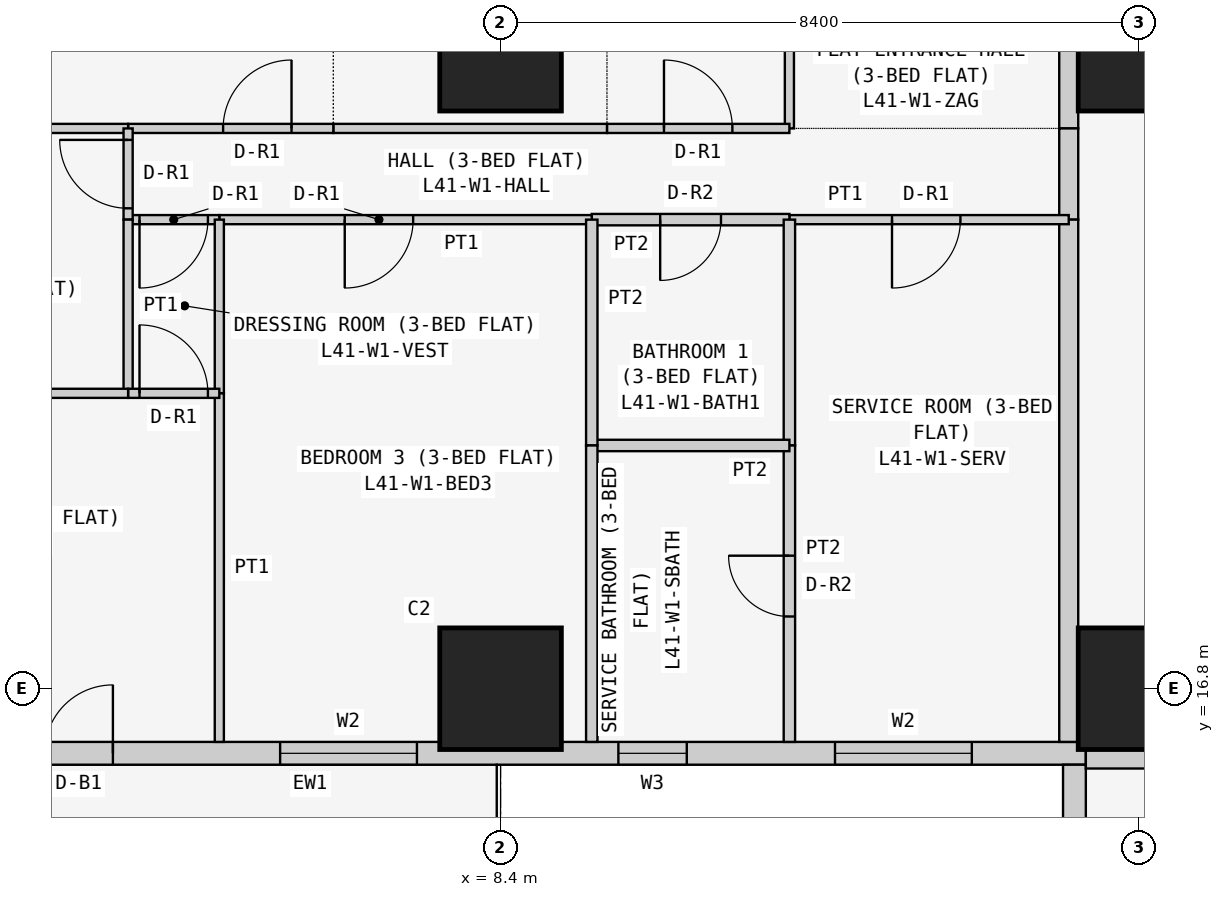
"""IFC4 building model, lengths in metres.
Left out: names, types, materials, properties, quantities, classifications, styles, units other than length and angle.
Written with IfcOpenShell. Run it as: python <this file> out.ifc"""

import sys

from ifc_helpers import new_model, si_unit, direction, frame, frame_2d, origin, origin_2d, place, context, subcontext, project, spatial, rectangle, extrude, element, fill, save


model = new_model("IFC4")
c1 = context("Model", 3, precision=1e-05, world=origin(), true_north=direction((0.0, 1.0)))
c2 = subcontext(c1, "Body", "Model", "MODEL_VIEW")
j1 = project(units=[si_unit("LENGTHUNIT", "METRE"), si_unit("PLANEANGLEUNIT", "RADIAN")], contexts=[c1])
p1 = place(None, origin())
s1 = spatial("IfcSite", under=j1, at=p1, CompositionType="ELEMENT")
p2 = place(p1, origin())
s2 = spatial("IfcBuilding", under=s1, at=p2, CompositionType="ELEMENT")
p3 = place(p2, frame((0.0, 0.0, 159.3)))
s3 = spatial("IfcBuildingStorey", under=s2, at=p3, CompositionType="ELEMENT", Elevation=159.3)
for number, where, z_axis, x_axis in (
    (1, (8.4, 16.8, 0.0), (0.0, 0.0, 1.0), (1.0, 0.0, 0.0)),
    (2, (8.4, 25.2, 0.0), (0.0, 0.0, 1.0), (1.0, 0.0, 0.0)),
    (3, (16.8, 16.8, 0.0), (0.0, 0.0, 1.0), (1.0, 0.0, 0.0)),
    (4, (16.8, 25.2, 0.0), (0.0, 0.0, 1.0), (1.0, 0.0, 0.0)),
):
    element("IfcColumn", number, at=place(p3, frame(where, z_axis=z_axis, x_axis=x_axis)), inside=s3, PredefinedType="COLUMN", context=c2, shape_type="SweptSolid", body=[
        extrude(rectangle(XDim=1.6, YDim=1.6, at=origin_2d()), origin(), (0.0, 0.0, 1.0), 3.6),
    ])
p4 = place(p3, frame((0.4, 15.95, 0.0), z_axis=(0.0, 0.0, 1.0), x_axis=(1.0, 0.0, 0.0)))
e5 = element("IfcWall", 5, at=p4, inside=s3, PredefinedType="SOLIDWALL", context=c2, shape_type="SweptSolid", body=[
    extrude(rectangle(XDim=15.7, YDim=0.3, at=frame_2d((7.85, 0.0))), origin(), (0.0, 0.0, 1.0), 3.45),
])
p5 = place(p4, frame((12.4, 0.0, 0.9)))
e6 = element("IfcOpeningElement", 6, at=p5, cuts=e5, PredefinedType="OPENING", context=c2, shape_type="SweptSolid", body=[
    extrude(rectangle(XDim=1.8, YDim=1.5, at=frame_2d((0.9, 0.75))), frame((0.0, 0.16, 0.0), z_axis=(0.0, -1.0, 0.0), x_axis=(1.0, 0.0, 0.0)), (0.0, 0.0, 1.0), 0.32),
])
p6 = place(p4, frame((9.55, 0.0, 1.5)))
e7 = element("IfcOpeningElement", 7, at=p6, cuts=e5, PredefinedType="OPENING", context=c2, shape_type="SweptSolid", body=[
    extrude(rectangle(XDim=0.9, YDim=0.7, at=frame_2d((0.45, 0.35))), frame((0.0, 0.16, 0.0), z_axis=(0.0, -1.0, 0.0), x_axis=(1.0, 0.0, 0.0)), (0.0, 0.0, 1.0), 0.32),
])
p7 = place(p4, frame((5.1, 0.0, 0.9)))
e8 = element("IfcOpeningElement", 8, at=p7, cuts=e5, PredefinedType="OPENING", context=c2, shape_type="SweptSolid", body=[
    extrude(rectangle(XDim=1.8, YDim=1.5, at=frame_2d((0.9, 0.75))), frame((0.0, 0.16, 0.0), z_axis=(0.0, -1.0, 0.0), x_axis=(1.0, 0.0, 0.0)), (0.0, 0.0, 1.0), 0.32),
])
p8 = place(p4, frame((2.0, 0.0, 0.0)))
e9 = element("IfcOpeningElement", 9, at=p8, cuts=e5, PredefinedType="OPENING", context=c2, shape_type="SweptSolid", body=[
    extrude(rectangle(XDim=0.9, YDim=2.4, at=frame_2d((0.45, 1.2))), frame((0.0, 0.16, 0.0), z_axis=(0.0, -1.0, 0.0), x_axis=(1.0, 0.0, 0.0)), (0.0, 0.0, 1.0), 0.32),
])
p9 = place(p4, frame((0.7, 0.0, 0.9)))
e10 = element("IfcOpeningElement", 10, at=p9, cuts=e5, PredefinedType="OPENING", context=c2, shape_type="SweptSolid", body=[
    extrude(rectangle(XDim=1.2, YDim=1.5, at=frame_2d((0.6, 0.75))), frame((0.0, 0.16, 0.0), z_axis=(0.0, -1.0, 0.0), x_axis=(1.0, 0.0, 0.0)), (0.0, 0.0, 1.0), 0.32),
])
p10 = place(p3, frame((15.95, 15.8, 0.0), z_axis=(0.0, 0.0, 1.0), x_axis=(0.0, -1.0, 0.0)))
e11 = element("IfcWall", 11, at=p10, inside=s3, PredefinedType="SOLIDWALL", context=c2, shape_type="SweptSolid", body=[
    extrude(rectangle(XDim=7.0, YDim=0.3, at=frame_2d((3.5, 0.0))), origin(), (0.0, 0.0, 1.0), 3.45),
])
p11 = place(p10, frame((1.5, 0.0, 0.9)))
e12 = element("IfcOpeningElement", 12, at=p11, cuts=e11, PredefinedType="OPENING", context=c2, shape_type="SweptSolid", body=[
    extrude(rectangle(XDim=2.4, YDim=1.5, at=frame_2d((1.2, 0.75))), frame((0.0, 0.16, 0.0), z_axis=(0.0, -1.0, 0.0), x_axis=(1.0, 0.0, 0.0)), (0.0, 0.0, 1.0), 0.32),
])
p12 = place(p10, frame((5.05, 0.0, 0.9)))
e13 = element("IfcOpeningElement", 13, at=p12, cuts=e11, PredefinedType="OPENING", context=c2, shape_type="SweptSolid", body=[
    extrude(rectangle(XDim=1.2, YDim=1.5, at=frame_2d((0.6, 0.75))), frame((0.0, 0.16, 0.0), z_axis=(0.0, -1.0, 0.0), x_axis=(1.0, 0.0, 0.0)), (0.0, 0.0, 1.0), 0.32),
])
p13 = place(p3, frame((22.571, 15.875, 0.0), z_axis=(0.0, 0.0, 1.0), x_axis=(-1.0, 0.0, 0.0)))
e14 = element("IfcWall", 14, at=p13, inside=s3, PredefinedType="PARTITIONING", context=c2, shape_type="SweptSolid", body=[
    extrude(rectangle(XDim=6.471, YDim=0.25, at=frame_2d((3.235, 0.0))), origin(), (0.0, 0.0, 1.0), 3.45),
])
p14 = place(p3, frame((15.875, 24.171, 0.0), z_axis=(0.0, 0.0, 1.0), x_axis=(0.0, 1.0, 0.0)))
e15 = element("IfcWall", 15, at=p14, inside=s3, PredefinedType="PARTITIONING", context=c2, shape_type="SweptSolid", body=[
    extrude(rectangle(XDim=5.229, YDim=0.25, at=frame_2d((2.615, 0.0))), origin(), (0.0, 0.0, 1.0), 3.45),
])
p15 = place(p14, frame((2.129, 0.0, 0.0)))
e16 = element("IfcOpeningElement", 16, at=p15, cuts=e15, PredefinedType="OPENING", context=c2, shape_type="SweptSolid", body=[
    extrude(rectangle(XDim=1.0, YDim=2.1, at=frame_2d((0.5, 1.05))), frame((0.0, 0.135, 0.0), z_axis=(0.0, -1.0, 0.0), x_axis=(1.0, 0.0, 0.0)), (0.0, 0.0, 1.0), 0.27),
])
p16 = place(p3, frame((15.875, 22.971, 0.0), z_axis=(0.0, 0.0, 1.0), x_axis=(0.0, 1.0, 0.0)))
e17 = element("IfcWall", 17, at=p16, inside=s3, PredefinedType="PARTITIONING", context=c2, shape_type="SweptSolid", body=[
    extrude(rectangle(XDim=1.2, YDim=0.25, at=frame_2d((0.6, 0.0))), origin(), (0.0, 0.0, 1.0), 3.45),
])
p17 = place(p3, frame((15.875, 16.1, 0.0), z_axis=(0.0, 0.0, 1.0), x_axis=(0.0, 1.0, 0.0)))
e18 = element("IfcWall", 18, at=p17, inside=s3, PredefinedType="PARTITIONING", context=c2, shape_type="SweptSolid", body=[
    extrude(rectangle(XDim=6.871, YDim=0.25, at=frame_2d((3.436, 0.0))), origin(), (0.0, 0.0, 1.0), 3.45),
])
p18 = place(p3, frame((12.2, 29.4, 0.0), z_axis=(0.0, 0.0, 1.0), x_axis=(0.0, -1.0, 0.0)))
e19 = element("IfcWall", 19, at=p18, inside=s3, PredefinedType="PARTITIONING", context=c2, shape_type="SweptSolid", body=[
    extrude(rectangle(XDim=5.229, YDim=0.12, at=frame_2d((2.615, 0.0))), origin(), (0.0, 0.0, 1.0), 3.45),
])
p19 = place(p3, frame((9.8, 24.171, 0.0), z_axis=(0.0, 0.0, 1.0), x_axis=(1.0, 0.0, 0.0)))
e20 = element("IfcWall", 20, at=p19, inside=s3, PredefinedType="PARTITIONING", context=c2, shape_type="SweptSolid", body=[
    extrude(rectangle(XDim=2.4, YDim=0.12, at=frame_2d((1.2, 0.0))), origin(), (0.0, 0.0, 1.0), 3.45),
])
p20 = place(p19, frame((0.75, 0.0, 0.0)))
e21 = element("IfcOpeningElement", 21, at=p20, cuts=e20, PredefinedType="OPENING", context=c2, shape_type="SweptSolid", body=[
    extrude(rectangle(XDim=0.9, YDim=2.1, at=frame_2d((0.45, 1.05))), frame((0.0, 0.07, 0.0), z_axis=(0.0, -1.0, 0.0), x_axis=(1.0, 0.0, 0.0)), (0.0, 0.0, 1.0), 0.14),
])
p21 = place(p3, frame((6.2, 24.171, 0.0), z_axis=(0.0, 0.0, 1.0), x_axis=(1.0, 0.0, 0.0)))
e22 = element("IfcWall", 22, at=p21, inside=s3, PredefinedType="PARTITIONING", context=c2, shape_type="SweptSolid", body=[
    extrude(rectangle(XDim=3.6, YDim=0.12, at=frame_2d((1.8, 0.0))), origin(), (0.0, 0.0, 1.0), 3.45),
])
p22 = place(p3, frame((3.5, 24.171, 0.0), z_axis=(0.0, 0.0, 1.0), x_axis=(1.0, 0.0, 0.0)))
e23 = element("IfcWall", 23, at=p22, inside=s3, PredefinedType="PARTITIONING", context=c2, shape_type="SweptSolid", body=[
    extrude(rectangle(XDim=2.7, YDim=0.12, at=frame_2d((1.35, 0.0))), origin(), (0.0, 0.0, 1.0), 3.45),
])
p23 = place(p22, frame((1.25, 0.0, 0.0)))
e24 = element("IfcOpeningElement", 24, at=p23, cuts=e23, PredefinedType="OPENING", context=c2, shape_type="SweptSolid", body=[
    extrude(rectangle(XDim=0.9, YDim=2.1, at=frame_2d((0.45, 1.05))), frame((0.0, 0.07, 0.0), z_axis=(0.0, -1.0, 0.0), x_axis=(1.0, 0.0, 0.0)), (0.0, 0.0, 1.0), 0.14),
])
p24 = place(p3, frame((-0.65, 24.171, 0.0), z_axis=(0.0, 0.0, 1.0), x_axis=(1.0, 0.0, 0.0)))
e25 = element("IfcWall", 25, at=p24, inside=s3, PredefinedType="PARTITIONING", context=c2, shape_type="SweptSolid", body=[
    extrude(rectangle(XDim=4.15, YDim=0.12, at=frame_2d((2.075, 0.0))), origin(), (0.0, 0.0, 1.0), 3.45),
])
p25 = place(p3, frame((12.2, 22.971, 0.0), z_axis=(0.0, 0.0, 1.0), x_axis=(1.0, 0.0, 0.0)))
e26 = element("IfcWall", 26, at=p25, inside=s3, PredefinedType="PARTITIONING", context=c2, shape_type="SweptSolid", body=[
    extrude(rectangle(XDim=3.675, YDim=0.12, at=frame_2d((1.837, 0.0))), origin(), (0.0, 0.0, 1.0), 3.45),
])
p26 = place(p25, frame((1.35, 0.0, 0.0)))
e27 = element("IfcOpeningElement", 27, at=p26, cuts=e26, PredefinedType="OPENING", context=c2, shape_type="SweptSolid", body=[
    extrude(rectangle(XDim=0.9, YDim=2.1, at=frame_2d((0.45, 1.05))), frame((0.0, 0.07, 0.0), z_axis=(0.0, -1.0, 0.0), x_axis=(1.0, 0.0, 0.0)), (0.0, 0.0, 1.0), 0.14),
])
p27 = place(p3, frame((9.6, 22.971, 0.0), z_axis=(0.0, 0.0, 1.0), x_axis=(1.0, 0.0, 0.0)))
e28 = element("IfcWall", 28, at=p27, inside=s3, PredefinedType="PARTITIONING", context=c2, shape_type="SweptSolid", body=[
    extrude(rectangle(XDim=2.6, YDim=0.15, at=frame_2d((1.3, 0.0))), origin(), (0.0, 0.0, 1.0), 3.45),
])
p28 = place(p27, frame((0.9, 0.0, 0.0)))
e29 = element("IfcOpeningElement", 29, at=p28, cuts=e28, PredefinedType="OPENING", context=c2, shape_type="SweptSolid", body=[
    extrude(rectangle(XDim=0.8, YDim=2.1, at=frame_2d((0.4, 1.05))), frame((0.0, 0.085, 0.0), z_axis=(0.0, -1.0, 0.0), x_axis=(1.0, 0.0, 0.0)), (0.0, 0.0, 1.0), 0.17),
])
p29 = place(p3, frame((4.7, 22.971, 0.0), z_axis=(0.0, 0.0, 1.0), x_axis=(1.0, 0.0, 0.0)))
e30 = element("IfcWall", 30, at=p29, inside=s3, PredefinedType="PARTITIONING", context=c2, shape_type="SweptSolid", body=[
    extrude(rectangle(XDim=4.9, YDim=0.12, at=frame_2d((2.45, 0.0))), origin(), (0.0, 0.0, 1.0), 3.45),
])
p30 = place(p29, frame((1.65, 0.0, 0.0)))
e31 = element("IfcOpeningElement", 31, at=p30, cuts=e30, PredefinedType="OPENING", context=c2, shape_type="SweptSolid", body=[
    extrude(rectangle(XDim=0.9, YDim=2.1, at=frame_2d((0.45, 1.05))), frame((0.0, 0.07, 0.0), z_axis=(0.0, -1.0, 0.0), x_axis=(1.0, 0.0, 0.0)), (0.0, 0.0, 1.0), 0.14),
])
p31 = place(p3, frame((3.5, 22.971, 0.0), z_axis=(0.0, 0.0, 1.0), x_axis=(1.0, 0.0, 0.0)))
e32 = element("IfcWall", 32, at=p31, inside=s3, PredefinedType="PARTITIONING", context=c2, shape_type="SweptSolid", body=[
    extrude(rectangle(XDim=1.2, YDim=0.12, at=frame_2d((0.6, 0.0))), origin(), (0.0, 0.0, 1.0), 3.45),
])
p32 = place(p31, frame((0.15, 0.0, 0.0)))
e33 = element("IfcOpeningElement", 33, at=p32, cuts=e32, PredefinedType="OPENING", context=c2, shape_type="SweptSolid", body=[
    extrude(rectangle(XDim=0.9, YDim=2.1, at=frame_2d((0.45, 1.05))), frame((0.0, 0.07, 0.0), z_axis=(0.0, -1.0, 0.0), x_axis=(1.0, 0.0, 0.0)), (0.0, 0.0, 1.0), 0.14),
])
p33 = place(p3, frame((3.5, 24.171, 0.0), z_axis=(0.0, 0.0, 1.0), x_axis=(0.0, -1.0, 0.0)))
e34 = element("IfcWall", 34, at=p33, inside=s3, PredefinedType="PARTITIONING", context=c2, shape_type="SweptSolid", body=[
    extrude(rectangle(XDim=1.2, YDim=0.12, at=frame_2d((0.6, 0.0))), origin(), (0.0, 0.0, 1.0), 3.45),
])
p34 = place(p33, frame((0.151, 0.0, 0.0)))
e35 = element("IfcOpeningElement", 35, at=p34, cuts=e34, PredefinedType="OPENING", context=c2, shape_type="SweptSolid", body=[
    extrude(rectangle(XDim=0.9, YDim=2.1, at=frame_2d((0.45, 1.05))), frame((0.0, 0.07, 0.0), z_axis=(0.0, -1.0, 0.0), x_axis=(1.0, 0.0, 0.0)), (0.0, 0.0, 1.0), 0.14),
])
p35 = place(p3, frame((12.2, 22.971, 0.0), z_axis=(0.0, 0.0, 1.0), x_axis=(0.0, -1.0, 0.0)))
e36 = element("IfcWall", 36, at=p35, inside=s3, PredefinedType="PARTITIONING", context=c2, shape_type="SweptSolid", body=[
    extrude(rectangle(XDim=2.971, YDim=0.15, at=frame_2d((1.485, 0.0))), origin(), (0.0, 0.0, 1.0), 3.45),
])
p36 = place(p3, frame((12.2, 20.0, 0.0), z_axis=(0.0, 0.0, 1.0), x_axis=(0.0, -1.0, 0.0)))
e37 = element("IfcWall", 37, at=p36, inside=s3, PredefinedType="PARTITIONING", context=c2, shape_type="SweptSolid", body=[
    extrude(rectangle(XDim=3.9, YDim=0.15, at=frame_2d((1.95, 0.0))), origin(), (0.0, 0.0, 1.0), 3.45),
])
p37 = place(p36, frame((1.45, 0.0, 0.0)))
e38 = element("IfcOpeningElement", 38, at=p37, cuts=e37, PredefinedType="OPENING", context=c2, shape_type="SweptSolid", body=[
    extrude(rectangle(XDim=0.8, YDim=2.1, at=frame_2d((0.4, 1.05))), frame((0.0, 0.085, 0.0), z_axis=(0.0, -1.0, 0.0), x_axis=(1.0, 0.0, 0.0)), (0.0, 0.0, 1.0), 0.17),
])
p38 = place(p3, frame((9.6, 20.0, 0.0), z_axis=(0.0, 0.0, 1.0), x_axis=(1.0, 0.0, 0.0)))
e39 = element("IfcWall", 39, at=p38, inside=s3, PredefinedType="PARTITIONING", context=c2, shape_type="SweptSolid", body=[
    extrude(rectangle(XDim=2.6, YDim=0.15, at=frame_2d((1.3, 0.0))), origin(), (0.0, 0.0, 1.0), 3.45),
])
p39 = place(p3, frame((9.6, 22.971, 0.0), z_axis=(0.0, 0.0, 1.0), x_axis=(0.0, -1.0, 0.0)))
e40 = element("IfcWall", 40, at=p39, inside=s3, PredefinedType="PARTITIONING", context=c2, shape_type="SweptSolid", body=[
    extrude(rectangle(XDim=2.971, YDim=0.15, at=frame_2d((1.485, 0.0))), origin(), (0.0, 0.0, 1.0), 3.45),
])
p40 = place(p3, frame((9.6, 20.0, 0.0), z_axis=(0.0, 0.0, 1.0), x_axis=(0.0, -1.0, 0.0)))
e41 = element("IfcWall", 41, at=p40, inside=s3, PredefinedType="PARTITIONING", context=c2, shape_type="SweptSolid", body=[
    extrude(rectangle(XDim=3.9, YDim=0.15, at=frame_2d((1.95, 0.0))), origin(), (0.0, 0.0, 1.0), 3.45),
])
p41 = place(p3, frame((4.7, 22.971, 0.0), z_axis=(0.0, 0.0, 1.0), x_axis=(0.0, -1.0, 0.0)))
e42 = element("IfcWall", 42, at=p41, inside=s3, PredefinedType="PARTITIONING", context=c2, shape_type="SweptSolid", body=[
    extrude(rectangle(XDim=2.285, YDim=0.12, at=frame_2d((1.143, 0.0))), origin(), (0.0, 0.0, 1.0), 3.45),
])
p42 = place(p3, frame((4.7, 20.686, 0.0), z_axis=(0.0, 0.0, 1.0), x_axis=(0.0, -1.0, 0.0)))
e43 = element("IfcWall", 43, at=p42, inside=s3, PredefinedType="PARTITIONING", context=c2, shape_type="SweptSolid", body=[
    extrude(rectangle(XDim=4.586, YDim=0.12, at=frame_2d((2.293, 0.0))), origin(), (0.0, 0.0, 1.0), 3.45),
])
p43 = place(p3, frame((3.5, 22.971, 0.0), z_axis=(0.0, 0.0, 1.0), x_axis=(0.0, -1.0, 0.0)))
e44 = element("IfcWall", 44, at=p43, inside=s3, PredefinedType="PARTITIONING", context=c2, shape_type="SweptSolid", body=[
    extrude(rectangle(XDim=2.285, YDim=0.12, at=frame_2d((1.143, 0.0))), origin(), (0.0, 0.0, 1.0), 3.45),
])
p44 = place(p3, frame((3.5, 20.686, 0.0), z_axis=(0.0, 0.0, 1.0), x_axis=(1.0, 0.0, 0.0)))
e45 = element("IfcWall", 45, at=p44, inside=s3, PredefinedType="PARTITIONING", context=c2, shape_type="SweptSolid", body=[
    extrude(rectangle(XDim=1.2, YDim=0.12, at=frame_2d((0.6, 0.0))), origin(), (0.0, 0.0, 1.0), 3.45),
])
p45 = place(p44, frame((0.15, 0.0, 0.0)))
e46 = element("IfcOpeningElement", 46, at=p45, cuts=e45, PredefinedType="OPENING", context=c2, shape_type="SweptSolid", body=[
    extrude(rectangle(XDim=0.9, YDim=2.1, at=frame_2d((0.45, 1.05))), frame((0.0, 0.07, 0.0), z_axis=(0.0, -1.0, 0.0), x_axis=(1.0, 0.0, 0.0)), (0.0, 0.0, 1.0), 0.14),
])
p46 = place(p3, frame((-0.65, 20.686, 0.0), z_axis=(0.0, 0.0, 1.0), x_axis=(1.0, 0.0, 0.0)))
e47 = element("IfcWall", 47, at=p46, inside=s3, PredefinedType="PARTITIONING", context=c2, shape_type="SweptSolid", body=[
    extrude(rectangle(XDim=4.15, YDim=0.12, at=frame_2d((2.075, 0.0))), origin(), (0.0, 0.0, 1.0), 3.45),
])
p47 = place(p5, origin())
e48 = element("IfcWindow", 48, at=p47, inside=s3, PartitioningType="SINGLE_PANEL", PredefinedType="WINDOW", context=c2, shape_type="SweptSolid", body=[
    extrude(rectangle(XDim=1.8, YDim=1.5, at=frame_2d((0.9, 0.75))), frame((0.0, 0.03, 0.0), z_axis=(0.0, -1.0, 0.0), x_axis=(1.0, 0.0, 0.0)), (0.0, 0.0, 1.0), 0.06),
])
fill(e6, e48)
p48 = place(p6, origin())
e49 = element("IfcWindow", 49, at=p48, inside=s3, PartitioningType="SINGLE_PANEL", PredefinedType="WINDOW", context=c2, shape_type="SweptSolid", body=[
    extrude(rectangle(XDim=0.9, YDim=0.7, at=frame_2d((0.45, 0.35))), frame((0.0, 0.03, 0.0), z_axis=(0.0, -1.0, 0.0), x_axis=(1.0, 0.0, 0.0)), (0.0, 0.0, 1.0), 0.06),
])
fill(e7, e49)
p49 = place(p7, origin())
e50 = element("IfcWindow", 50, at=p49, inside=s3, PartitioningType="SINGLE_PANEL", PredefinedType="WINDOW", context=c2, shape_type="SweptSolid", body=[
    extrude(rectangle(XDim=1.8, YDim=1.5, at=frame_2d((0.9, 0.75))), frame((0.0, 0.03, 0.0), z_axis=(0.0, -1.0, 0.0), x_axis=(1.0, 0.0, 0.0)), (0.0, 0.0, 1.0), 0.06),
])
fill(e8, e50)
p50 = place(p8, origin())
e51 = element("IfcDoor", 51, at=p50, inside=s3, OperationType="SINGLE_SWING_RIGHT", PredefinedType="DOOR", context=c2, shape_type="SweptSolid", body=[
    extrude(rectangle(XDim=0.9, YDim=2.4, at=frame_2d((0.45, 1.2))), frame((0.0, 0.025, 0.0), z_axis=(0.0, -1.0, 0.0), x_axis=(1.0, 0.0, 0.0)), (0.0, 0.0, 1.0), 0.05),
])
fill(e9, e51)
p51 = place(p20, origin())
e52 = element("IfcDoor", 52, at=p51, inside=s3, OperationType="SINGLE_SWING_LEFT", PredefinedType="DOOR", context=c2, shape_type="SweptSolid", body=[
    extrude(rectangle(XDim=0.9, YDim=2.1, at=frame_2d((0.45, 1.05))), frame((0.0, 0.025, 0.0), z_axis=(0.0, -1.0, 0.0), x_axis=(1.0, 0.0, 0.0)), (0.0, 0.0, 1.0), 0.05),
])
fill(e21, e52)
p52 = place(p23, origin())
e53 = element("IfcDoor", 53, at=p52, inside=s3, OperationType="SINGLE_SWING_RIGHT", PredefinedType="DOOR", context=c2, shape_type="SweptSolid", body=[
    extrude(rectangle(XDim=0.9, YDim=2.1, at=frame_2d((0.45, 1.05))), frame((0.0, 0.025, 0.0), z_axis=(0.0, -1.0, 0.0), x_axis=(1.0, 0.0, 0.0)), (0.0, 0.0, 1.0), 0.05),
])
fill(e24, e53)
p53 = place(p26, frame((0.9, 0.0, 0.0), z_axis=(0.0, 0.0, 1.0), x_axis=(-1.0, 0.0, 0.0)))
e54 = element("IfcDoor", 54, at=p53, inside=s3, OperationType="SINGLE_SWING_RIGHT", PredefinedType="DOOR", context=c2, shape_type="SweptSolid", body=[
    extrude(rectangle(XDim=0.9, YDim=2.1, at=frame_2d((0.45, 1.05))), frame((0.0, 0.025, 0.0), z_axis=(0.0, -1.0, 0.0), x_axis=(1.0, 0.0, 0.0)), (0.0, 0.0, 1.0), 0.05),
])
fill(e27, e54)
p54 = place(p37, frame((0.8, 0.0, 0.0), z_axis=(0.0, 0.0, 1.0), x_axis=(-1.0, 0.0, 0.0)))
e55 = element("IfcDoor", 55, at=p54, inside=s3, OperationType="SINGLE_SWING_RIGHT", PredefinedType="DOOR", context=c2, shape_type="SweptSolid", body=[
    extrude(rectangle(XDim=0.8, YDim=2.1, at=frame_2d((0.4, 1.05))), frame((0.0, 0.025, 0.0), z_axis=(0.0, -1.0, 0.0), x_axis=(1.0, 0.0, 0.0)), (0.0, 0.0, 1.0), 0.05),
])
fill(e38, e55)
p55 = place(p28, frame((0.8, 0.0, 0.0), z_axis=(0.0, 0.0, 1.0), x_axis=(-1.0, 0.0, 0.0)))
e56 = element("IfcDoor", 56, at=p55, inside=s3, OperationType="SINGLE_SWING_RIGHT", PredefinedType="DOOR", context=c2, shape_type="SweptSolid", body=[
    extrude(rectangle(XDim=0.8, YDim=2.1, at=frame_2d((0.4, 1.05))), frame((0.0, 0.025, 0.0), z_axis=(0.0, -1.0, 0.0), x_axis=(1.0, 0.0, 0.0)), (0.0, 0.0, 1.0), 0.05),
])
fill(e29, e56)
p56 = place(p30, frame((0.9, 0.0, 0.0), z_axis=(0.0, 0.0, 1.0), x_axis=(-1.0, 0.0, 0.0)))
e57 = element("IfcDoor", 57, at=p56, inside=s3, OperationType="SINGLE_SWING_RIGHT", PredefinedType="DOOR", context=c2, shape_type="SweptSolid", body=[
    extrude(rectangle(XDim=0.9, YDim=2.1, at=frame_2d((0.45, 1.05))), frame((0.0, 0.025, 0.0), z_axis=(0.0, -1.0, 0.0), x_axis=(1.0, 0.0, 0.0)), (0.0, 0.0, 1.0), 0.05),
])
fill(e31, e57)
p57 = place(p32, frame((0.9, 0.0, 0.0), z_axis=(0.0, 0.0, 1.0), x_axis=(-1.0, 0.0, 0.0)))
e58 = element("IfcDoor", 58, at=p57, inside=s3, OperationType="SINGLE_SWING_RIGHT", PredefinedType="DOOR", context=c2, shape_type="SweptSolid", body=[
    extrude(rectangle(XDim=0.9, YDim=2.1, at=frame_2d((0.45, 1.05))), frame((0.0, 0.025, 0.0), z_axis=(0.0, -1.0, 0.0), x_axis=(1.0, 0.0, 0.0)), (0.0, 0.0, 1.0), 0.05),
])
fill(e33, e58)
p58 = place(p45, origin())
e59 = element("IfcDoor", 59, at=p58, inside=s3, OperationType="SINGLE_SWING_LEFT", PredefinedType="DOOR", context=c2, shape_type="SweptSolid", body=[
    extrude(rectangle(XDim=0.9, YDim=2.1, at=frame_2d((0.45, 1.05))), frame((0.0, 0.025, 0.0), z_axis=(0.0, -1.0, 0.0), x_axis=(1.0, 0.0, 0.0)), (0.0, 0.0, 1.0), 0.05),
])
fill(e46, e59)
p59 = place(p34, frame((0.9, 0.0, 0.0), z_axis=(0.0, 0.0, 1.0), x_axis=(-1.0, 0.0, 0.0)))
e60 = element("IfcDoor", 60, at=p59, inside=s3, OperationType="SINGLE_SWING_RIGHT", PredefinedType="DOOR", context=c2, shape_type="SweptSolid", body=[
    extrude(rectangle(XDim=0.9, YDim=2.1, at=frame_2d((0.45, 1.05))), frame((0.0, 0.025, 0.0), z_axis=(0.0, -1.0, 0.0), x_axis=(1.0, 0.0, 0.0)), (0.0, 0.0, 1.0), 0.05),
])
fill(e35, e60)
save(model, sys.argv[1])
